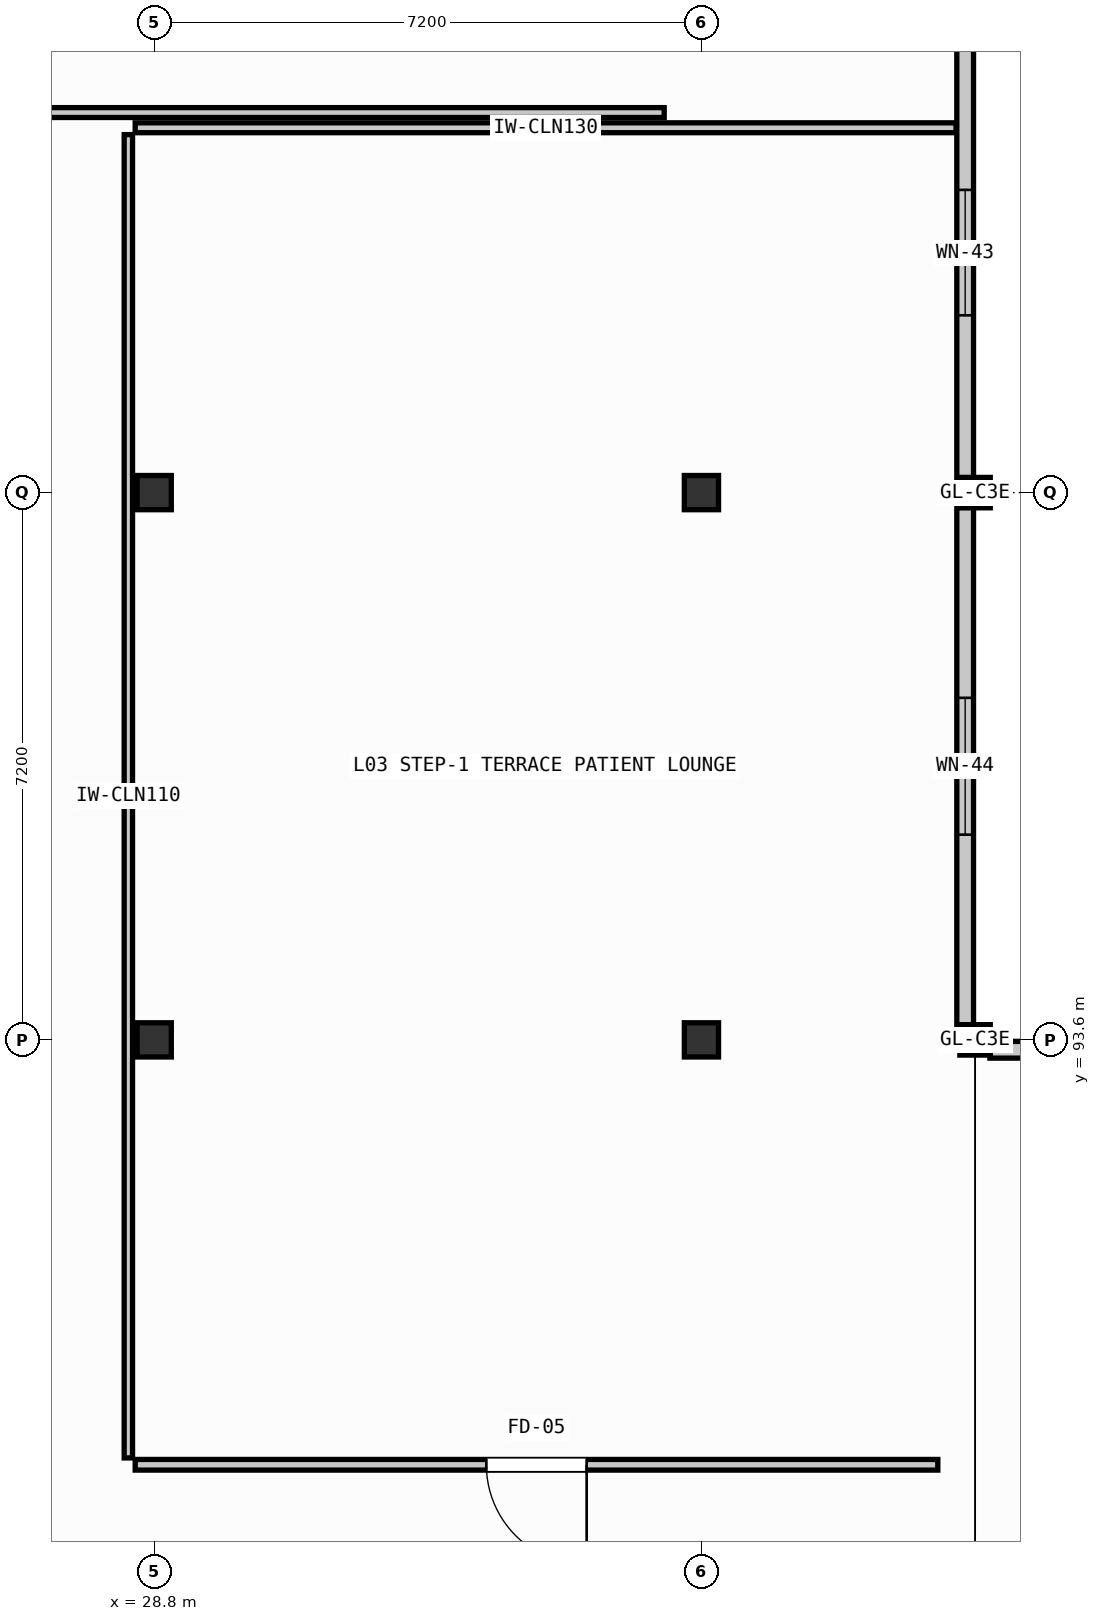
"""IFC4 building model, lengths in metres.
Left out: names, types, materials, properties, quantities, classifications, styles, units other than length and angle.
Written with IfcOpenShell. Run it as: python <this file> out.ifc"""

import sys

from ifc_helpers import new_model, si_unit, direction, frame, frame_2d, origin, origin_2d, place, context, subcontext, project, spatial, rectangle, extrude, element, fill, save


model = new_model("IFC4")
c1 = context("Model", 3, precision=1e-05, world=origin(), true_north=direction((0.0, 1.0)))
c2 = subcontext(c1, "Body", "Model", "MODEL_VIEW")
j1 = project(units=[si_unit("LENGTHUNIT", "METRE"), si_unit("PLANEANGLEUNIT", "RADIAN")], contexts=[c1])
p1 = place(None, origin())
s1 = spatial("IfcSite", under=j1, at=p1, CompositionType="ELEMENT")
p2 = place(p1, origin())
s2 = spatial("IfcBuilding", under=s1, at=p2, CompositionType="ELEMENT")
p3 = place(p2, frame((0.0, 0.0, 9.3)))
s3 = spatial("IfcBuildingStorey", under=s2, at=p3, CompositionType="ELEMENT", Elevation=9.3)
for number, where, z_axis, x_axis in (
    (1, (28.8, 93.6, 0.0), (0.0, 0.0, 1.0), (1.0, 0.0, 0.0)),
    (2, (28.8, 100.8, 0.0), (0.0, 0.0, 1.0), (1.0, 0.0, 0.0)),
    (3, (36.0, 93.6, 0.0), (0.0, 0.0, 1.0), (1.0, 0.0, 0.0)),
    (4, (36.0, 100.8, 0.0), (0.0, 0.0, 1.0), (1.0, 0.0, 0.0)),
):
    element("IfcColumn", number, at=place(p3, frame(where, z_axis=z_axis, x_axis=x_axis)), inside=s3, PredefinedType="COLUMN", context=c2, shape_type="SweptSolid", body=[
        extrude(rectangle(XDim=0.45, YDim=0.45, at=origin_2d()), origin(), (0.0, 0.0, 1.0), 3.99),
    ])
for number, where, z_axis, x_axis in (
    (5, (39.6, 93.6, 0.0), (0.0, 0.0, 1.0), (1.0, 0.0, 0.0)),
    (6, (39.6, 100.8, 0.0), (0.0, 0.0, 1.0), (1.0, 0.0, 0.0)),
):
    element("IfcColumn", number, at=place(p3, frame(where, z_axis=z_axis, x_axis=x_axis)), inside=s3, PredefinedType="COLUMN", context=c2, shape_type="SweptSolid", body=[
        extrude(rectangle(XDim=0.4, YDim=0.4, at=origin_2d()), origin(), (0.0, 0.0, 1.0), 3.98),
    ])
p4 = place(p3, frame((39.47, 108.02, 0.0), z_axis=(0.0, 0.0, 1.0), x_axis=(0.0, -1.0, 0.0)))
e7 = element("IfcWall", 7, at=p4, inside=s3, PredefinedType="SOLIDWALL", context=c2, shape_type="SweptSolid", body=[
    extrude(rectangle(XDim=7.025, YDim=0.22, at=frame_2d((3.512, 0.0))), origin(), (0.0, 0.0, 1.0), 3.26),
])
p5 = place(p4, frame((3.238, 0.0, 0.95)))
e8 = element("IfcOpeningElement", 8, at=p5, cuts=e7, PredefinedType="OPENING", context=c2, shape_type="SweptSolid", body=[
    extrude(rectangle(XDim=1.65, YDim=1.55, at=frame_2d((0.825, 0.775))), frame((0.0, 0.12, 0.0), z_axis=(0.0, -1.0, 0.0), x_axis=(1.0, 0.0, 0.0)), (0.0, 0.0, 1.0), 0.24),
])
p6 = place(p3, frame((39.47, 100.605, 0.0), z_axis=(0.0, 0.0, 1.0), x_axis=(0.0, -1.0, 0.0)))
e9 = element("IfcWall", 9, at=p6, inside=s3, PredefinedType="SOLIDWALL", context=c2, shape_type="SweptSolid", body=[
    extrude(rectangle(XDim=6.81, YDim=0.22, at=frame_2d((3.405, 0.0))), origin(), (0.0, 0.0, 1.0), 3.26),
])
p7 = place(p6, frame((2.505, 0.0, 0.95)))
e10 = element("IfcOpeningElement", 10, at=p7, cuts=e9, PredefinedType="OPENING", context=c2, shape_type="SweptSolid", body=[
    extrude(rectangle(XDim=1.8, YDim=1.55, at=frame_2d((0.9, 0.775))), frame((0.0, 0.12, 0.0), z_axis=(0.0, -1.0, 0.0), x_axis=(1.0, 0.0, 0.0)), (0.0, 0.0, 1.0), 0.24),
])
p8 = place(p3, frame((39.795, 93.47, 0.0), z_axis=(0.0, 0.0, 1.0), x_axis=(1.0, 0.0, 0.0)))
e11 = element("IfcWall", 11, at=p8, inside=s3, PredefinedType="SOLIDWALL", context=c2, shape_type="SweptSolid", body=[
    extrude(rectangle(XDim=3.2, YDim=0.22, at=frame_2d((1.6, 0.0))), origin(), (0.0, 0.0, 1.0), 3.26),
])
p9 = place(p8, frame((0.625, 0.0, 0.95)))
e12 = element("IfcOpeningElement", 12, at=p9, cuts=e11, PredefinedType="OPENING", context=c2, shape_type="SweptSolid", body=[
    extrude(rectangle(XDim=1.95, YDim=1.55, at=frame_2d((0.975, 0.775))), frame((0.0, 0.12, 0.0), z_axis=(0.0, -1.0, 0.0), x_axis=(1.0, 0.0, 0.0)), (0.0, 0.0, 1.0), 0.24),
])
p10 = place(p3, frame((28.55, 105.6, 0.0), z_axis=(0.0, 0.0, 1.0), x_axis=(1.0, 0.0, 0.0)))
e13 = element("IfcWall", 13, at=p10, inside=s3, PredefinedType="PARTITIONING", context=c2, shape_type="SweptSolid", body=[
    extrude(rectangle(XDim=10.8, YDim=0.13, at=frame_2d((5.4, 0.0))), origin(), (0.0, 0.0, 1.0), 3.35),
])
p11 = place(p3, frame((39.11, 88.01, 0.0), z_axis=(0.0, 0.0, 1.0), x_axis=(-1.0, 0.0, 0.0)))
e14 = element("IfcWall", 14, at=p11, inside=s3, PredefinedType="PARTITIONING", context=c2, shape_type="SweptSolid", body=[
    extrude(rectangle(XDim=10.56, YDim=0.14, at=frame_2d((5.28, 0.0))), origin(), (0.0, 0.0, 1.0), 3.35),
])
p12 = place(p11, frame((4.62, 0.0, 0.0)))
e15 = element("IfcOpeningElement", 15, at=p12, cuts=e14, PredefinedType="OPENING", context=c2, shape_type="SweptSolid", body=[
    extrude(rectangle(XDim=1.32, YDim=2.2, at=frame_2d((0.66, 1.1))), frame((0.0, 0.08, 0.0), z_axis=(0.0, -1.0, 0.0), x_axis=(1.0, 0.0, 0.0)), (0.0, 0.0, 1.0), 0.16),
])
p13 = place(p3, frame((28.46, 88.1, 0.0), z_axis=(0.0, 0.0, 1.0), x_axis=(0.0, 1.0, 0.0)))
e16 = element("IfcWall", 16, at=p13, inside=s3, PredefinedType="PARTITIONING", context=c2, shape_type="SweptSolid", body=[
    extrude(rectangle(XDim=17.41, YDim=0.11, at=frame_2d((8.705, 0.0))), origin(), (0.0, 0.0, 1.0), 3.97),
])
p14 = place(p3, frame((35.51, 105.8, 0.0), z_axis=(0.0, 0.0, 1.0), x_axis=(-1.0, 0.0, 0.0)))
e17 = element("IfcWall", 17, at=p14, inside=s3, PredefinedType="PARTITIONING", context=c2, shape_type="SweptSolid", body=[
    extrude(rectangle(XDim=10.241, YDim=0.13, at=frame_2d((5.12, 0.0))), origin(), (0.0, 0.0, 1.0), 3.35),
])
p15 = place(p5, origin())
e18 = element("IfcWindow", 18, at=p15, inside=s3, PartitioningType="SINGLE_PANEL", PredefinedType="WINDOW", context=c2, shape_type="SweptSolid", body=[
    extrude(rectangle(XDim=1.65, YDim=1.55, at=frame_2d((0.825, 0.775))), frame((0.0, 0.03, 0.0), z_axis=(0.0, -1.0, 0.0), x_axis=(1.0, 0.0, 0.0)), (0.0, 0.0, 1.0), 0.06),
])
fill(e8, e18)
p16 = place(p7, origin())
e19 = element("IfcWindow", 19, at=p16, inside=s3, PartitioningType="SINGLE_PANEL", PredefinedType="WINDOW", context=c2, shape_type="SweptSolid", body=[
    extrude(rectangle(XDim=1.8, YDim=1.55, at=frame_2d((0.9, 0.775))), frame((0.0, 0.03, 0.0), z_axis=(0.0, -1.0, 0.0), x_axis=(1.0, 0.0, 0.0)), (0.0, 0.0, 1.0), 0.06),
])
fill(e10, e19)
p17 = place(p12, origin())
e20 = element("IfcDoor", 20, at=p17, inside=s3, OperationType="SINGLE_SWING_RIGHT", PredefinedType="DOOR", context=c2, shape_type="SweptSolid", body=[
    extrude(rectangle(XDim=1.32, YDim=2.2, at=frame_2d((0.66, 1.1))), frame((0.0, 0.025, 0.0), z_axis=(0.0, -1.0, 0.0), x_axis=(1.0, 0.0, 0.0)), (0.0, 0.0, 1.0), 0.05),
])
fill(e15, e20)
save(model, sys.argv[1])
